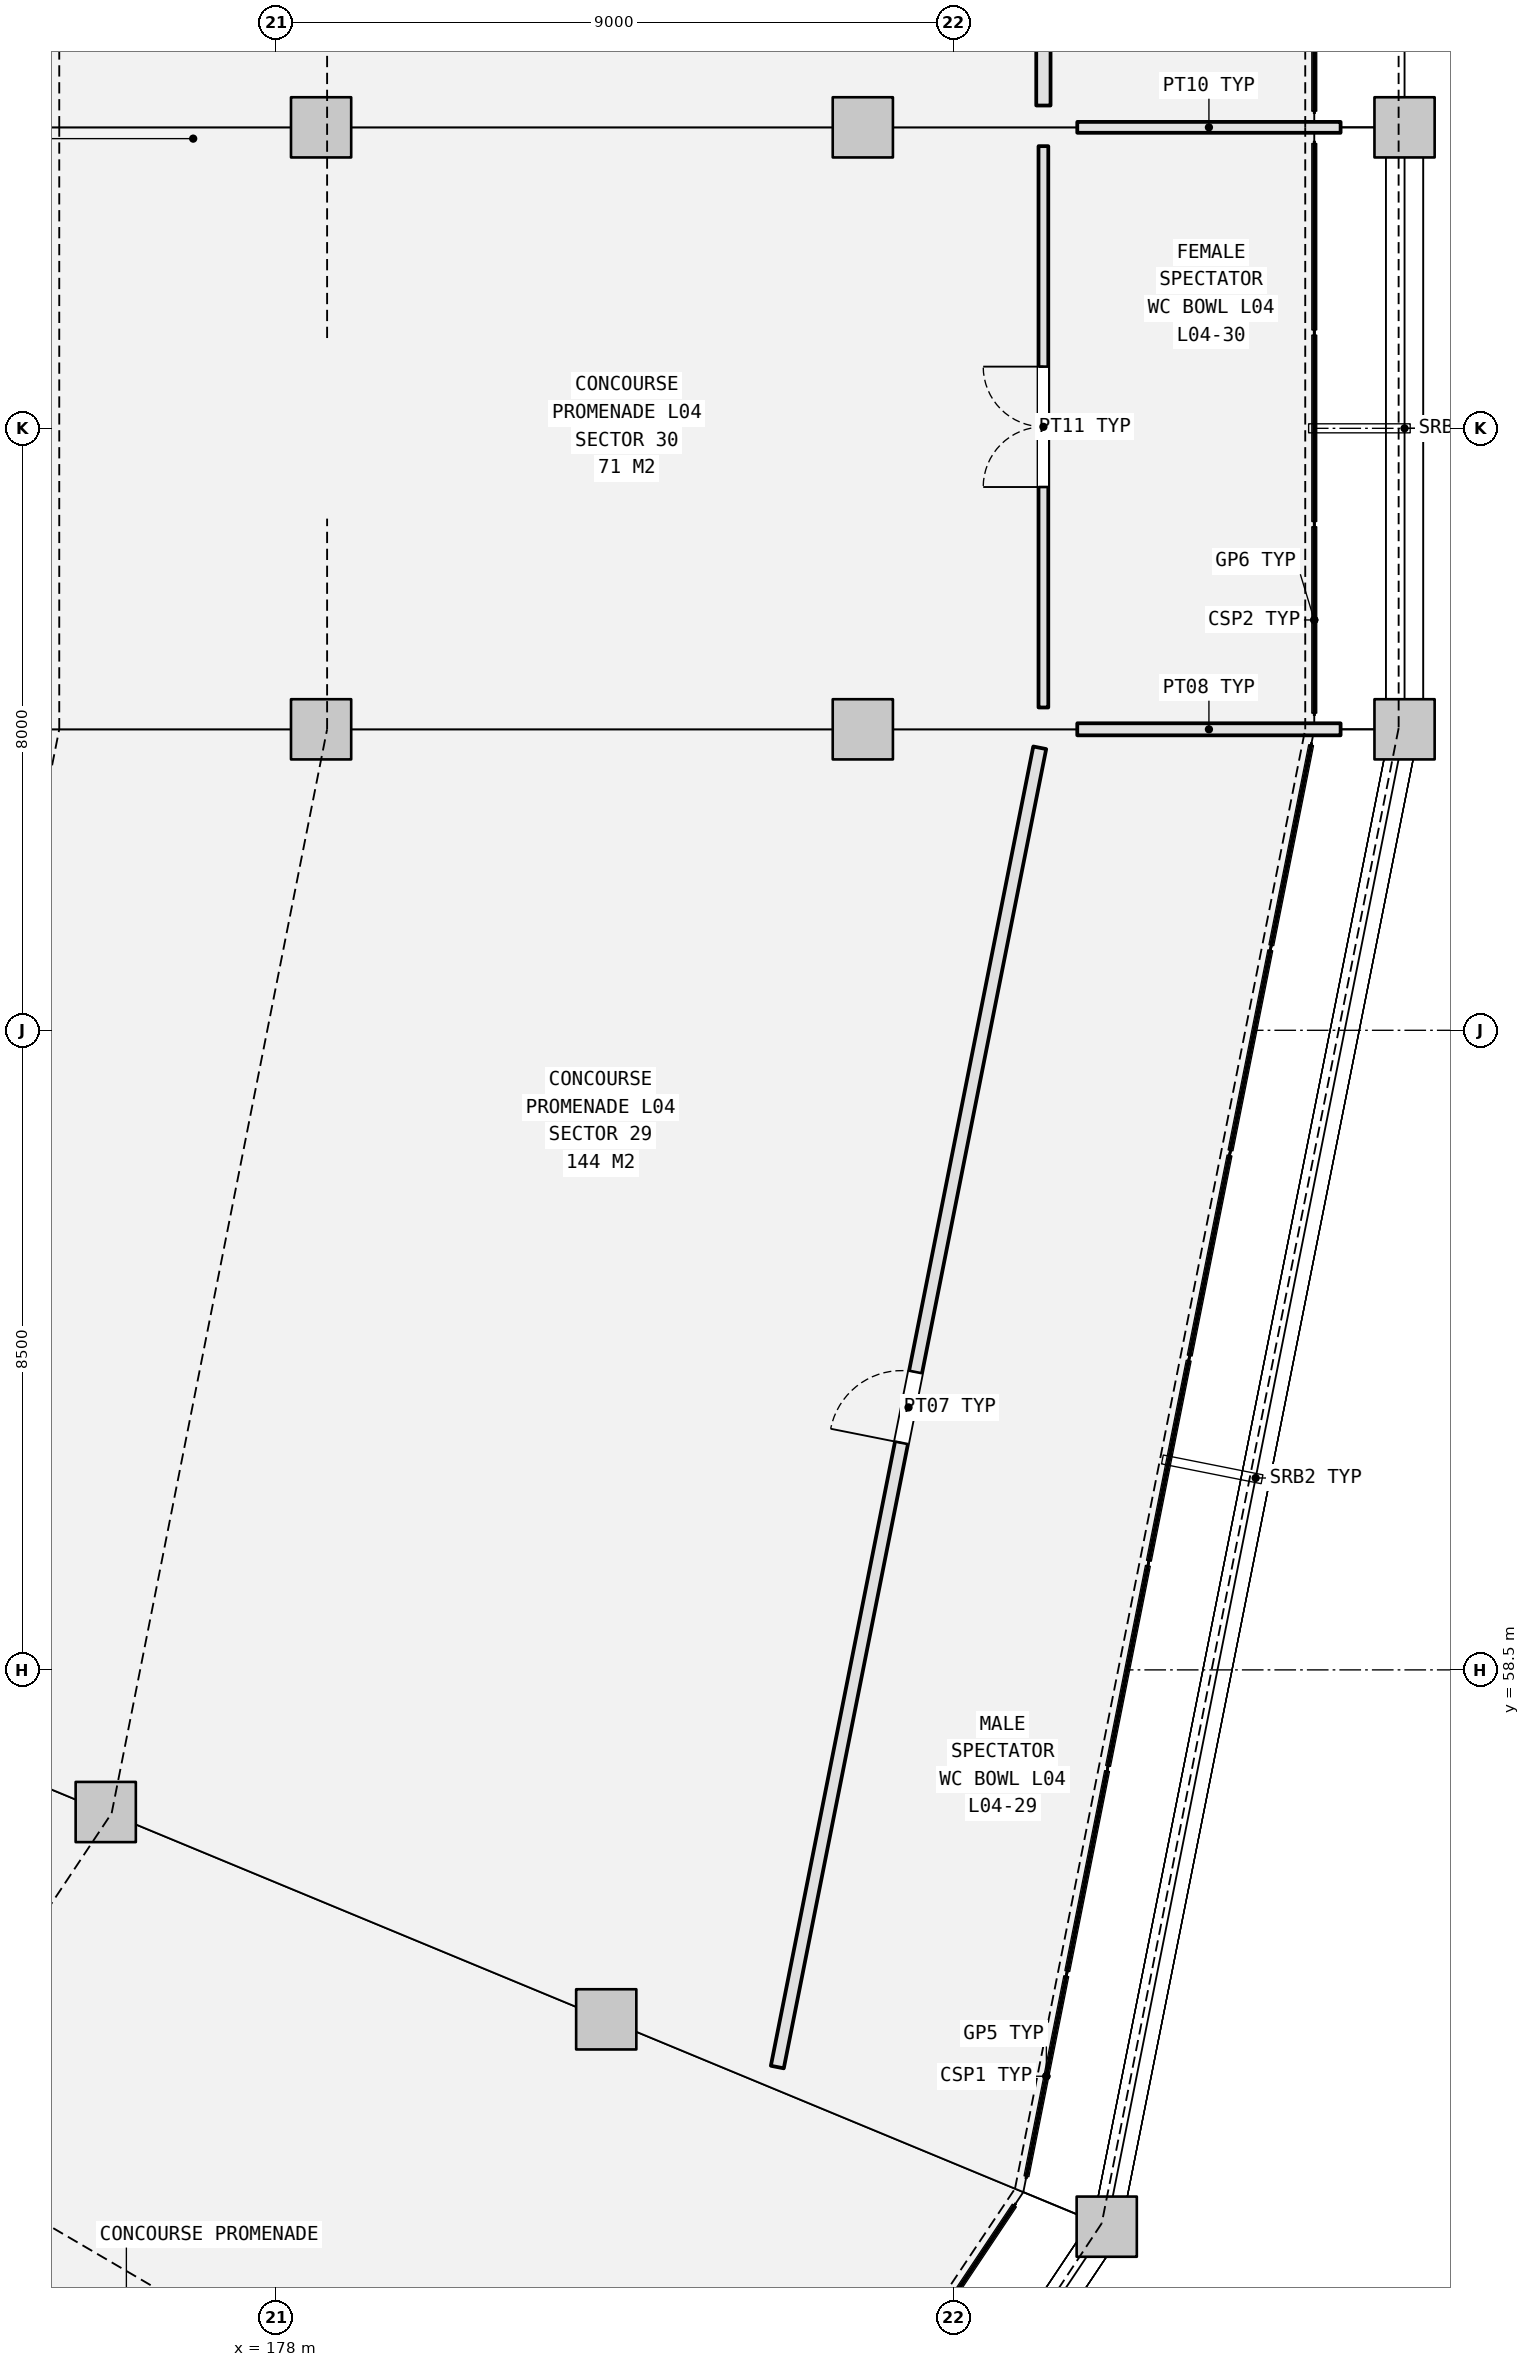
"""IFC4 building model, lengths in metres.
Left out: names, types, materials, properties, quantities, classifications, styles, units other than length and angle.
Written with IfcOpenShell. Run it as: python <this file> out.ifc"""

import sys

from ifc_helpers import new_model, si_unit, direction, frame, frame_2d, origin, origin_2d, place, context, subcontext, project, spatial, rectangle, extrude, element, fill, save


model = new_model("IFC4")
c1 = context("Model", 3, precision=1e-05, world=origin(), true_north=direction((0.0, 1.0)))
c2 = subcontext(c1, "Body", "Model", "MODEL_VIEW")
j1 = project(units=[si_unit("LENGTHUNIT", "METRE"), si_unit("PLANEANGLEUNIT", "RADIAN")], contexts=[c1])
p1 = place(None, origin())
s1 = spatial("IfcSite", under=j1, at=p1, CompositionType="ELEMENT")
p2 = place(p1, origin())
s2 = spatial("IfcBuilding", under=s1, at=p2, CompositionType="ELEMENT")
p3 = place(p2, frame((0.0, 0.0, 21.6)))
s3 = spatial("IfcBuildingStorey", under=s2, at=p3, CompositionType="ELEMENT", Elevation=21.6)
for number, where, z_axis, x_axis in (
    (1, (175.738, 56.611, 0.0), (0.0, 0.0, 1.0), (1.0, 0.0, 0.0)),
    (2, (182.39, 53.856, 0.0), (0.0, 0.0, 1.0), (1.0, 0.0, 0.0)),
    (3, (189.042, 51.1, 0.0), (0.0, 0.0, 1.0), (1.0, 0.0, 0.0)),
    (4, (178.6, 71.0, 0.0), (0.0, 0.0, 1.0), (1.0, 0.0, 0.0)),
    (5, (185.8, 71.0, 0.0), (0.0, 0.0, 1.0), (1.0, 0.0, 0.0)),
    (6, (193.0, 71.0, 0.0), (0.0, 0.0, 1.0), (1.0, 0.0, 0.0)),
    (7, (178.6, 79.0, 0.0), (0.0, 0.0, 1.0), (1.0, 0.0, 0.0)),
    (8, (185.8, 79.0, 0.0), (0.0, 0.0, 1.0), (1.0, 0.0, 0.0)),
    (9, (193.0, 79.0, 0.0), (0.0, 0.0, 1.0), (1.0, 0.0, 0.0)),
):
    element("IfcColumn", number, at=place(p3, frame(where, z_axis=z_axis, x_axis=x_axis)), inside=s3, PredefinedType="COLUMN", context=c2, shape_type="SweptSolid", body=[
        extrude(rectangle(XDim=0.8, YDim=0.8, at=origin_2d()), origin(), (0.0, 0.0, 1.0), 5.4),
    ])
p4 = place(p3, frame((184.664, 53.222, 0.0), z_axis=(0.0, 0.0, 1.0), x_axis=(0.195075994915, 0.980788130132, 0.0)))
e10 = element("IfcWall", 10, at=p4, inside=s3, PredefinedType="PARTITIONING", context=c2, shape_type="SweptSolid", body=[
    extrude(rectangle(XDim=17.877, YDim=0.175, at=frame_2d((8.938, 0.0))), origin(), (0.0, 0.0, 1.0), 2.772),
])
p5 = place(p4, frame((8.458, 0.0, 0.0)))
e11 = element("IfcOpeningElement", 11, at=p5, cuts=e10, PredefinedType="OPENING", context=c2, shape_type="SweptSolid", body=[
    extrude(rectangle(XDim=0.96, YDim=2.15, at=frame_2d((0.48, 1.075))), frame((0.0, 0.097, 0.0), z_axis=(0.0, -1.0, 0.0), x_axis=(1.0, 0.0, 0.0)), (0.0, 0.0, 1.0), 0.195),
])
p6 = place(p3, frame((188.65, 71.0, 0.0), z_axis=(0.0, 0.0, 1.0), x_axis=(1.0, 0.0, 0.0)))
e12 = element("IfcWall", 12, at=p6, inside=s3, PredefinedType="PARTITIONING", context=c2, shape_type="SweptSolid", body=[
    extrude(rectangle(XDim=3.5, YDim=0.16, at=frame_2d((1.75, 0.0))), origin(), (0.0, 0.0, 1.0), 2.772),
])
p7 = place(p3, frame((188.2, 71.29, 0.0), z_axis=(0.0, 0.0, 1.0), x_axis=(0.0, 1.0, 0.0)))
e13 = element("IfcWall", 13, at=p7, inside=s3, PredefinedType="PARTITIONING", context=c2, shape_type="SweptSolid", body=[
    extrude(rectangle(XDim=7.46, YDim=0.13, at=frame_2d((3.73, 0.0))), origin(), (0.0, 0.0, 1.0), 2.772),
])
p8 = place(p7, frame((2.93, 0.0, 0.0)))
e14 = element("IfcOpeningElement", 14, at=p8, cuts=e13, PredefinedType="OPENING", context=c2, shape_type="SweptSolid", body=[
    extrude(rectangle(XDim=1.6, YDim=2.2, at=frame_2d((0.8, 1.1))), frame((0.0, 0.075, 0.0), z_axis=(0.0, -1.0, 0.0), x_axis=(1.0, 0.0, 0.0)), (0.0, 0.0, 1.0), 0.15),
])
p9 = place(p3, frame((188.65, 79.0, 0.0), z_axis=(0.0, 0.0, 1.0), x_axis=(1.0, 0.0, 0.0)))
e15 = element("IfcWall", 15, at=p9, inside=s3, PredefinedType="PARTITIONING", context=c2, shape_type="SweptSolid", body=[
    extrude(rectangle(XDim=3.5, YDim=0.145, at=frame_2d((1.75, 0.0))), origin(), (0.0, 0.0, 1.0), 2.772),
])
p10 = place(p3, frame((188.2, 79.29, 0.0), z_axis=(0.0, 0.0, 1.0), x_axis=(0.0, 1.0, 0.0)))
e16 = element("IfcWall", 16, at=p10, inside=s3, PredefinedType="PARTITIONING", context=c2, shape_type="SweptSolid", body=[
    extrude(rectangle(XDim=7.46, YDim=0.19, at=frame_2d((3.73, 0.0))), origin(), (0.0, 0.0, 1.0), 2.772),
])
p11 = place(p10, frame((3.28, 0.0, 0.0)))
e17 = element("IfcOpeningElement", 17, at=p11, cuts=e16, PredefinedType="OPENING", context=c2, shape_type="SweptSolid", body=[
    extrude(rectangle(XDim=0.9, YDim=2.1, at=frame_2d((0.45, 1.05))), frame((0.0, 0.105, 0.0), z_axis=(0.0, -1.0, 0.0), x_axis=(1.0, 0.0, 0.0)), (0.0, 0.0, 1.0), 0.21),
])
p12 = place(p5, origin())
e18 = element("IfcDoor", 18, at=p12, inside=s3, OperationType="SINGLE_SWING_LEFT", PredefinedType="DOOR", context=c2, shape_type="SweptSolid", body=[
    extrude(rectangle(XDim=0.96, YDim=2.15, at=frame_2d((0.48, 1.075))), frame((0.0, 0.025, 0.0), z_axis=(0.0, -1.0, 0.0), x_axis=(1.0, 0.0, 0.0)), (0.0, 0.0, 1.0), 0.05),
])
fill(e11, e18)
p13 = place(p8, origin())
e19 = element("IfcDoor", 19, at=p13, inside=s3, OperationType="DOUBLE_DOOR_SINGLE_SWING", PredefinedType="DOOR", context=c2, shape_type="SweptSolid", body=[
    extrude(rectangle(XDim=1.6, YDim=2.2, at=frame_2d((0.8, 1.1))), frame((0.0, 0.025, 0.0), z_axis=(0.0, -1.0, 0.0), x_axis=(1.0, 0.0, 0.0)), (0.0, 0.0, 1.0), 0.05),
])
fill(e14, e19)
save(model, sys.argv[1])
